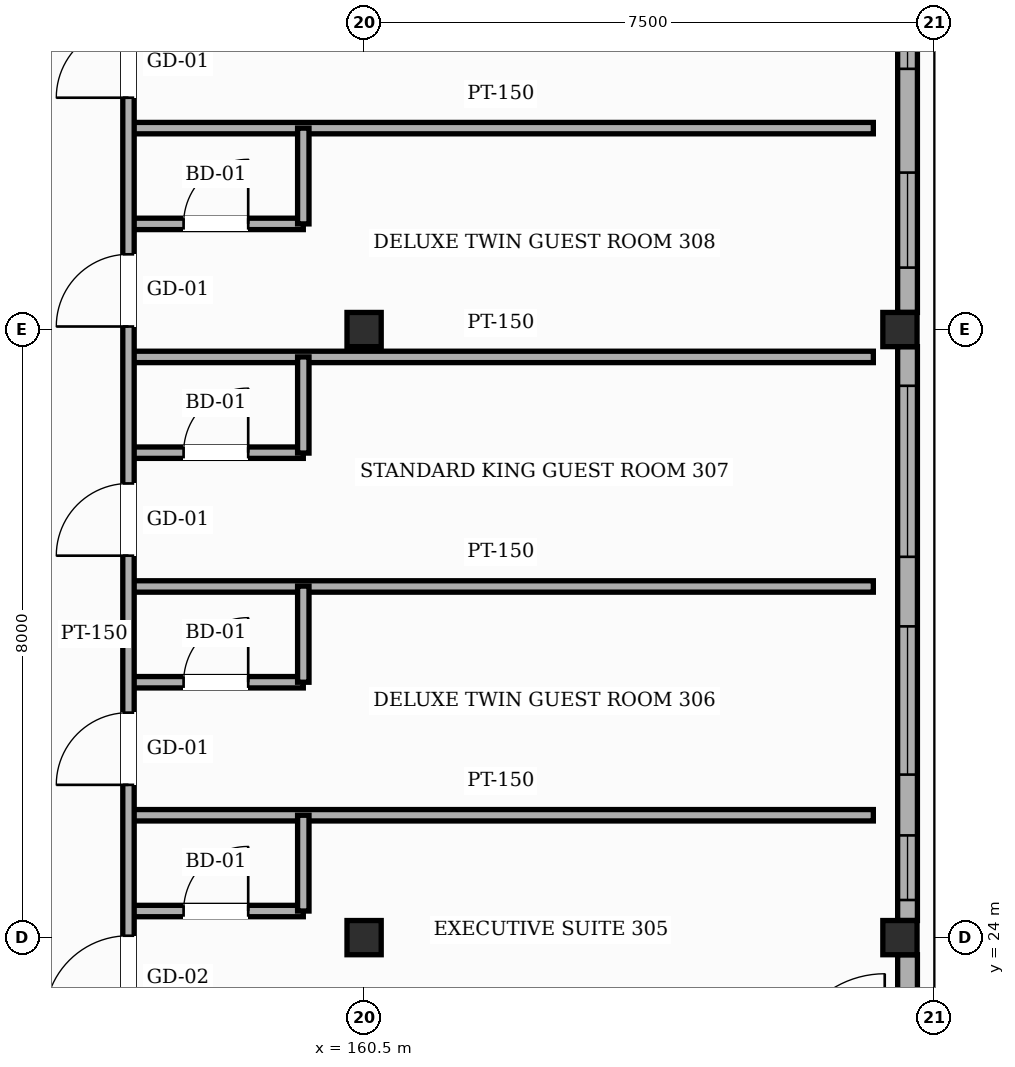
"""IFC4 building model, lengths in metres.
Left out: names, types, materials, properties, quantities, classifications, styles, units other than length and angle.
Written with IfcOpenShell. Run it as: python <this file> out.ifc"""

import sys

from ifc_helpers import new_model, si_unit, direction, frame, frame_2d, origin, origin_2d, place, context, subcontext, project, spatial, rectangle, hollow_rectangle, extrude, element, fill, save


model = new_model("IFC4")
c1 = context("Model", 3, precision=1e-05, world=origin(), true_north=direction((0.0, 1.0)))
c2 = subcontext(c1, "Body", "Model", "MODEL_VIEW")
j1 = project(units=[si_unit("LENGTHUNIT", "METRE"), si_unit("PLANEANGLEUNIT", "RADIAN")], contexts=[c1])
p1 = place(None, origin())
s1 = spatial("IfcSite", under=j1, at=p1, CompositionType="ELEMENT")
p2 = place(p1, origin())
s2 = spatial("IfcBuilding", under=s1, at=p2, CompositionType="ELEMENT")
p3 = place(p2, frame((0.0, 0.0, 42.6)))
s3 = spatial("IfcBuildingStorey", under=s2, at=p3, CompositionType="ELEMENT", Elevation=42.6)
for number, where, z_axis, x_axis in (
    (1, (160.5, 24.0, 0.0), (0.0, 0.0, 1.0), (1.0, 0.0, 0.0)),
    (2, (160.5, 32.0, 0.0), (0.0, 0.0, 1.0), (1.0, 0.0, 0.0)),
    (3, (167.55, 24.0, 0.0), (0.0, 0.0, 1.0), (1.0, 0.0, 0.0)),
    (4, (167.55, 32.0, 0.0), (0.0, 0.0, 1.0), (1.0, 0.0, 0.0)),
):
    element("IfcColumn", number, at=place(p3, frame(where, z_axis=z_axis, x_axis=x_axis)), inside=s3, PredefinedType="COLUMN", context=c2, shape_type="SweptSolid", body=[
        extrude(hollow_rectangle(XDim=0.45, YDim=0.45, WallThickness=0.019, InnerFilletRadius=0.019, OuterFilletRadius=0.038, at=origin_2d()), origin(), (0.0, 0.0, 1.0), 3.6),
    ])
p4 = place(p3, frame((167.65, 23.775, 0.0), z_axis=(0.0, 0.0, 1.0), x_axis=(0.0, -1.0, 0.0)))
e5 = element("IfcWall", 5, at=p4, inside=s3, PredefinedType="SOLIDWALL", context=c2, shape_type="SweptSolid", body=[
    extrude(rectangle(XDim=1.55, YDim=0.26, at=frame_2d((0.775, 0.0))), origin(), (0.0, 0.0, 1.0), 3.365),
])
p5 = place(p3, frame((167.65, 31.775, 0.0), z_axis=(0.0, 0.0, 1.0), x_axis=(0.0, -1.0, 0.0)))
e6 = element("IfcWall", 6, at=p5, inside=s3, PredefinedType="SOLIDWALL", context=c2, shape_type="SweptSolid", body=[
    extrude(rectangle(XDim=7.55, YDim=0.26, at=frame_2d((3.775, 0.0))), origin(), (0.0, 0.0, 1.0), 2.755),
])
p6 = place(p5, frame((6.43, 0.0, 0.85)))
e7 = element("IfcOpeningElement", 7, at=p6, cuts=e6, PredefinedType="OPENING", context=c2, shape_type="SweptSolid", body=[
    extrude(rectangle(XDim=0.85, YDim=1.35, at=frame_2d((0.425, 0.675))), frame((0.0, 0.14, 0.0), z_axis=(0.0, -1.0, 0.0), x_axis=(1.0, 0.0, 0.0)), (0.0, 0.0, 1.0), 0.28),
])
p7 = place(p5, frame((3.68, 0.0, 0.85)))
e8 = element("IfcOpeningElement", 8, at=p7, cuts=e6, PredefinedType="OPENING", context=c2, shape_type="SweptSolid", body=[
    extrude(rectangle(XDim=1.95, YDim=1.5, at=frame_2d((0.975, 0.75))), frame((0.0, 0.14, 0.0), z_axis=(0.0, -1.0, 0.0), x_axis=(1.0, 0.0, 0.0)), (0.0, 0.0, 1.0), 0.28),
])
p8 = place(p5, frame((0.515, 0.0, 0.85)))
e9 = element("IfcOpeningElement", 9, at=p8, cuts=e6, PredefinedType="OPENING", context=c2, shape_type="SweptSolid", body=[
    extrude(rectangle(XDim=2.25, YDim=1.5, at=frame_2d((1.125, 0.75))), frame((0.0, 0.14, 0.0), z_axis=(0.0, -1.0, 0.0), x_axis=(1.0, 0.0, 0.0)), (0.0, 0.0, 1.0), 0.28),
])
p9 = place(p3, frame((167.65, 40.675, 0.0), z_axis=(0.0, 0.0, 1.0), x_axis=(0.0, -1.0, 0.0)))
e10 = element("IfcWall", 10, at=p9, inside=s3, PredefinedType="SOLIDWALL", context=c2, shape_type="SweptSolid", body=[
    extrude(rectangle(XDim=8.45, YDim=0.26, at=frame_2d((4.225, 0.0))), origin(), (0.0, 0.0, 1.0), 2.755),
])
p10 = place(p9, frame((6.61, 0.0, 0.85)))
e11 = element("IfcOpeningElement", 11, at=p10, cuts=e10, PredefinedType="OPENING", context=c2, shape_type="SweptSolid", body=[
    extrude(rectangle(XDim=1.25, YDim=1.65, at=frame_2d((0.625, 0.825))), frame((0.0, 0.14, 0.0), z_axis=(0.0, -1.0, 0.0), x_axis=(1.0, 0.0, 0.0)), (0.0, 0.0, 1.0), 0.28),
])
p11 = place(p9, frame((3.795, 0.0, 0.85)))
e12 = element("IfcOpeningElement", 12, at=p11, cuts=e10, PredefinedType="OPENING", context=c2, shape_type="SweptSolid", body=[
    extrude(rectangle(XDim=1.45, YDim=1.65, at=frame_2d((0.725, 0.825))), frame((0.0, 0.14, 0.0), z_axis=(0.0, -1.0, 0.0), x_axis=(1.0, 0.0, 0.0)), (0.0, 0.0, 1.0), 0.28),
])
p12 = place(p9, frame((0.685, 0.0, 0.85)))
e13 = element("IfcOpeningElement", 13, at=p12, cuts=e10, PredefinedType="OPENING", context=c2, shape_type="SweptSolid", body=[
    extrude(rectangle(XDim=1.65, YDim=1.65, at=frame_2d((0.825, 0.825))), frame((0.0, 0.14, 0.0), z_axis=(0.0, -1.0, 0.0), x_axis=(1.0, 0.0, 0.0)), (0.0, 0.0, 1.0), 0.28),
])
p13 = place(p3, frame((157.4, 24.35, 0.0), z_axis=(0.0, 0.0, 1.0), x_axis=(1.0, 0.0, 0.0)))
e14 = element("IfcWall", 14, at=p13, inside=s3, PredefinedType="PARTITIONING", context=c2, shape_type="SweptSolid", body=[
    extrude(rectangle(XDim=2.3, YDim=0.15, at=frame_2d((1.15, 0.0))), origin(), (0.0, 0.0, 1.0), 3.365),
])
p14 = place(p13, frame((0.725, 0.0, 0.0)))
e15 = element("IfcOpeningElement", 15, at=p14, cuts=e14, PredefinedType="OPENING", context=c2, shape_type="SweptSolid", body=[
    extrude(rectangle(XDim=0.85, YDim=2.1, at=frame_2d((0.425, 1.05))), frame((0.0, 0.085, 0.0), z_axis=(0.0, -1.0, 0.0), x_axis=(1.0, 0.0, 0.0)), (0.0, 0.0, 1.0), 0.17),
])
p15 = place(p3, frame((157.4, 25.61, 0.0), z_axis=(0.0, 0.0, 1.0), x_axis=(1.0, 0.0, 0.0)))
e16 = element("IfcWall", 16, at=p15, inside=s3, PredefinedType="PARTITIONING", context=c2, shape_type="SweptSolid", body=[
    extrude(rectangle(XDim=9.8, YDim=0.15, at=frame_2d((4.9, 0.0))), origin(), (0.0, 0.0, 1.0), 3.365),
])
p16 = place(p3, frame((157.4, 27.36, 0.0), z_axis=(0.0, 0.0, 1.0), x_axis=(1.0, 0.0, 0.0)))
e17 = element("IfcWall", 17, at=p16, inside=s3, PredefinedType="PARTITIONING", context=c2, shape_type="SweptSolid", body=[
    extrude(rectangle(XDim=2.3, YDim=0.15, at=frame_2d((1.15, 0.0))), origin(), (0.0, 0.0, 1.0), 3.365),
])
p17 = place(p16, frame((0.725, 0.0, 0.0)))
e18 = element("IfcOpeningElement", 18, at=p17, cuts=e17, PredefinedType="OPENING", context=c2, shape_type="SweptSolid", body=[
    extrude(rectangle(XDim=0.85, YDim=2.1, at=frame_2d((0.425, 1.05))), frame((0.0, 0.085, 0.0), z_axis=(0.0, -1.0, 0.0), x_axis=(1.0, 0.0, 0.0)), (0.0, 0.0, 1.0), 0.17),
])
p18 = place(p3, frame((157.4, 28.62, 0.0), z_axis=(0.0, 0.0, 1.0), x_axis=(1.0, 0.0, 0.0)))
e19 = element("IfcWall", 19, at=p18, inside=s3, PredefinedType="PARTITIONING", context=c2, shape_type="SweptSolid", body=[
    extrude(rectangle(XDim=9.8, YDim=0.15, at=frame_2d((4.9, 0.0))), origin(), (0.0, 0.0, 1.0), 3.365),
])
p19 = place(p3, frame((157.4, 30.38, 0.0), z_axis=(0.0, 0.0, 1.0), x_axis=(1.0, 0.0, 0.0)))
e20 = element("IfcWall", 20, at=p19, inside=s3, PredefinedType="PARTITIONING", context=c2, shape_type="SweptSolid", body=[
    extrude(rectangle(XDim=2.3, YDim=0.15, at=frame_2d((1.15, 0.0))), origin(), (0.0, 0.0, 1.0), 3.365),
])
p20 = place(p19, frame((0.725, 0.0, 0.0)))
e21 = element("IfcOpeningElement", 21, at=p20, cuts=e20, PredefinedType="OPENING", context=c2, shape_type="SweptSolid", body=[
    extrude(rectangle(XDim=0.85, YDim=2.1, at=frame_2d((0.425, 1.05))), frame((0.0, 0.085, 0.0), z_axis=(0.0, -1.0, 0.0), x_axis=(1.0, 0.0, 0.0)), (0.0, 0.0, 1.0), 0.17),
])
p21 = place(p3, frame((157.4, 31.64, 0.0), z_axis=(0.0, 0.0, 1.0), x_axis=(1.0, 0.0, 0.0)))
e22 = element("IfcWall", 22, at=p21, inside=s3, PredefinedType="PARTITIONING", context=c2, shape_type="SweptSolid", body=[
    extrude(rectangle(XDim=9.8, YDim=0.15, at=frame_2d((4.9, 0.0))), origin(), (0.0, 0.0, 1.0), 3.365),
])
p22 = place(p3, frame((157.4, 33.39, 0.0), z_axis=(0.0, 0.0, 1.0), x_axis=(1.0, 0.0, 0.0)))
e23 = element("IfcWall", 23, at=p22, inside=s3, PredefinedType="PARTITIONING", context=c2, shape_type="SweptSolid", body=[
    extrude(rectangle(XDim=2.3, YDim=0.15, at=frame_2d((1.15, 0.0))), origin(), (0.0, 0.0, 1.0), 3.365),
])
p23 = place(p22, frame((0.725, 0.0, 0.0)))
e24 = element("IfcOpeningElement", 24, at=p23, cuts=e23, PredefinedType="OPENING", context=c2, shape_type="SweptSolid", body=[
    extrude(rectangle(XDim=0.85, YDim=2.1, at=frame_2d((0.425, 1.05))), frame((0.0, 0.085, 0.0), z_axis=(0.0, -1.0, 0.0), x_axis=(1.0, 0.0, 0.0)), (0.0, 0.0, 1.0), 0.17),
])
p24 = place(p3, frame((157.4, 34.65, 0.0), z_axis=(0.0, 0.0, 1.0), x_axis=(1.0, 0.0, 0.0)))
e25 = element("IfcWall", 25, at=p24, inside=s3, PredefinedType="PARTITIONING", context=c2, shape_type="SweptSolid", body=[
    extrude(rectangle(XDim=9.8, YDim=0.15, at=frame_2d((4.9, 0.0))), origin(), (0.0, 0.0, 1.0), 3.365),
])
p25 = place(p3, frame((157.4, 22.6, 0.0), z_axis=(0.0, 0.0, 1.0), x_axis=(0.0, 1.0, 0.0)))
e26 = element("IfcWall", 26, at=p25, inside=s3, PredefinedType="PARTITIONING", context=c2, shape_type="SweptSolid", body=[
    extrude(rectangle(XDim=48.2, YDim=0.15, at=frame_2d((24.1, 0.0))), origin(), (0.0, 0.0, 1.0), 3.365),
])
p26 = place(p25, frame((0.325, 0.0, 0.0)))
e27 = element("IfcOpeningElement", 27, at=p26, cuts=e26, PredefinedType="OPENING", context=c2, shape_type="SweptSolid", body=[
    extrude(rectangle(XDim=1.1, YDim=2.2, at=frame_2d((0.55, 1.1))), frame((0.0, 0.085, 0.0), z_axis=(0.0, -1.0, 0.0), x_axis=(1.0, 0.0, 0.0)), (0.0, 0.0, 1.0), 0.17),
])
p27 = place(p25, frame((3.41, 0.0, 0.0)))
e28 = element("IfcOpeningElement", 28, at=p27, cuts=e26, PredefinedType="OPENING", context=c2, shape_type="SweptSolid", body=[
    extrude(rectangle(XDim=0.95, YDim=2.15, at=frame_2d((0.475, 1.075))), frame((0.0, 0.085, 0.0), z_axis=(0.0, -1.0, 0.0), x_axis=(1.0, 0.0, 0.0)), (0.0, 0.0, 1.0), 0.17),
])
p28 = place(p25, frame((6.425, 0.0, 0.0)))
e29 = element("IfcOpeningElement", 29, at=p28, cuts=e26, PredefinedType="OPENING", context=c2, shape_type="SweptSolid", body=[
    extrude(rectangle(XDim=0.95, YDim=2.15, at=frame_2d((0.475, 1.075))), frame((0.0, 0.085, 0.0), z_axis=(0.0, -1.0, 0.0), x_axis=(1.0, 0.0, 0.0)), (0.0, 0.0, 1.0), 0.17),
])
p29 = place(p25, frame((9.44, 0.0, 0.0)))
e30 = element("IfcOpeningElement", 30, at=p29, cuts=e26, PredefinedType="OPENING", context=c2, shape_type="SweptSolid", body=[
    extrude(rectangle(XDim=0.95, YDim=2.15, at=frame_2d((0.475, 1.075))), frame((0.0, 0.085, 0.0), z_axis=(0.0, -1.0, 0.0), x_axis=(1.0, 0.0, 0.0)), (0.0, 0.0, 1.0), 0.17),
])
p30 = place(p25, frame((12.45, 0.0, 0.0)))
e31 = element("IfcOpeningElement", 31, at=p30, cuts=e26, PredefinedType="OPENING", context=c2, shape_type="SweptSolid", body=[
    extrude(rectangle(XDim=0.95, YDim=2.15, at=frame_2d((0.475, 1.075))), frame((0.0, 0.085, 0.0), z_axis=(0.0, -1.0, 0.0), x_axis=(1.0, 0.0, 0.0)), (0.0, 0.0, 1.0), 0.17),
])
p31 = place(p25, frame((15.46, 0.0, 0.0)))
e32 = element("IfcOpeningElement", 32, at=p31, cuts=e26, PredefinedType="OPENING", context=c2, shape_type="SweptSolid", body=[
    extrude(rectangle(XDim=0.95, YDim=2.15, at=frame_2d((0.475, 1.075))), frame((0.0, 0.085, 0.0), z_axis=(0.0, -1.0, 0.0), x_axis=(1.0, 0.0, 0.0)), (0.0, 0.0, 1.0), 0.17),
])
p32 = place(p25, frame((18.475, 0.0, 0.0)))
e33 = element("IfcOpeningElement", 33, at=p32, cuts=e26, PredefinedType="OPENING", context=c2, shape_type="SweptSolid", body=[
    extrude(rectangle(XDim=0.95, YDim=2.15, at=frame_2d((0.475, 1.075))), frame((0.0, 0.085, 0.0), z_axis=(0.0, -1.0, 0.0), x_axis=(1.0, 0.0, 0.0)), (0.0, 0.0, 1.0), 0.17),
])
p33 = place(p25, frame((21.49, 0.0, 0.0)))
e34 = element("IfcOpeningElement", 34, at=p33, cuts=e26, PredefinedType="OPENING", context=c2, shape_type="SweptSolid", body=[
    extrude(rectangle(XDim=0.95, YDim=2.15, at=frame_2d((0.475, 1.075))), frame((0.0, 0.085, 0.0), z_axis=(0.0, -1.0, 0.0), x_axis=(1.0, 0.0, 0.0)), (0.0, 0.0, 1.0), 0.17),
])
p34 = place(p25, frame((24.5, 0.0, 0.0)))
e35 = element("IfcOpeningElement", 35, at=p34, cuts=e26, PredefinedType="OPENING", context=c2, shape_type="SweptSolid", body=[
    extrude(rectangle(XDim=0.95, YDim=2.15, at=frame_2d((0.475, 1.075))), frame((0.0, 0.085, 0.0), z_axis=(0.0, -1.0, 0.0), x_axis=(1.0, 0.0, 0.0)), (0.0, 0.0, 1.0), 0.17),
])
p35 = place(p25, frame((27.51, 0.0, 0.0)))
e36 = element("IfcOpeningElement", 36, at=p35, cuts=e26, PredefinedType="OPENING", context=c2, shape_type="SweptSolid", body=[
    extrude(rectangle(XDim=0.95, YDim=2.15, at=frame_2d((0.475, 1.075))), frame((0.0, 0.085, 0.0), z_axis=(0.0, -1.0, 0.0), x_axis=(1.0, 0.0, 0.0)), (0.0, 0.0, 1.0), 0.17),
])
p36 = place(p25, frame((30.525, 0.0, 0.0)))
e37 = element("IfcOpeningElement", 37, at=p36, cuts=e26, PredefinedType="OPENING", context=c2, shape_type="SweptSolid", body=[
    extrude(rectangle(XDim=0.95, YDim=2.15, at=frame_2d((0.475, 1.075))), frame((0.0, 0.085, 0.0), z_axis=(0.0, -1.0, 0.0), x_axis=(1.0, 0.0, 0.0)), (0.0, 0.0, 1.0), 0.17),
])
p37 = place(p25, frame((33.54, 0.0, 0.0)))
e38 = element("IfcOpeningElement", 38, at=p37, cuts=e26, PredefinedType="OPENING", context=c2, shape_type="SweptSolid", body=[
    extrude(rectangle(XDim=0.95, YDim=2.15, at=frame_2d((0.475, 1.075))), frame((0.0, 0.085, 0.0), z_axis=(0.0, -1.0, 0.0), x_axis=(1.0, 0.0, 0.0)), (0.0, 0.0, 1.0), 0.17),
])
p38 = place(p25, frame((36.55, 0.0, 0.0)))
e39 = element("IfcOpeningElement", 39, at=p38, cuts=e26, PredefinedType="OPENING", context=c2, shape_type="SweptSolid", body=[
    extrude(rectangle(XDim=0.95, YDim=2.15, at=frame_2d((0.475, 1.075))), frame((0.0, 0.085, 0.0), z_axis=(0.0, -1.0, 0.0), x_axis=(1.0, 0.0, 0.0)), (0.0, 0.0, 1.0), 0.17),
])
p39 = place(p25, frame((39.56, 0.0, 0.0)))
e40 = element("IfcOpeningElement", 40, at=p39, cuts=e26, PredefinedType="OPENING", context=c2, shape_type="SweptSolid", body=[
    extrude(rectangle(XDim=0.95, YDim=2.15, at=frame_2d((0.475, 1.075))), frame((0.0, 0.085, 0.0), z_axis=(0.0, -1.0, 0.0), x_axis=(1.0, 0.0, 0.0)), (0.0, 0.0, 1.0), 0.17),
])
p40 = place(p25, frame((42.575, 0.0, 0.0)))
e41 = element("IfcOpeningElement", 41, at=p40, cuts=e26, PredefinedType="OPENING", context=c2, shape_type="SweptSolid", body=[
    extrude(rectangle(XDim=0.95, YDim=2.15, at=frame_2d((0.475, 1.075))), frame((0.0, 0.085, 0.0), z_axis=(0.0, -1.0, 0.0), x_axis=(1.0, 0.0, 0.0)), (0.0, 0.0, 1.0), 0.17),
])
p41 = place(p25, frame((45.585, 0.0, 0.0)))
e42 = element("IfcOpeningElement", 42, at=p41, cuts=e26, PredefinedType="OPENING", context=c2, shape_type="SweptSolid", body=[
    extrude(rectangle(XDim=0.95, YDim=2.15, at=frame_2d((0.475, 1.075))), frame((0.0, 0.085, 0.0), z_axis=(0.0, -1.0, 0.0), x_axis=(1.0, 0.0, 0.0)), (0.0, 0.0, 1.0), 0.17),
])
p42 = place(p3, frame((159.7, 24.35, 0.0), z_axis=(0.0, 0.0, 1.0), x_axis=(0.0, 1.0, 0.0)))
e43 = element("IfcWall", 43, at=p42, inside=s3, PredefinedType="PARTITIONING", context=c2, shape_type="SweptSolid", body=[
    extrude(rectangle(XDim=1.26, YDim=0.15, at=frame_2d((0.63, 0.0))), origin(), (0.0, 0.0, 1.0), 3.365),
])
for number, where, z_axis, x_axis in (
    (44, (159.7, 27.36, 0.0), (0.0, 0.0, 1.0), (0.0, 1.0, 0.0)),
    (45, (159.7, 30.375, 0.0), (0.0, 0.0, 1.0), (0.0, 1.0, 0.0)),
):
    element("IfcWall", number, at=place(p3, frame(where, z_axis=z_axis, x_axis=x_axis)), inside=s3, PredefinedType="PARTITIONING", context=c2, shape_type="SweptSolid", body=[
        extrude(rectangle(XDim=1.265, YDim=0.15, at=frame_2d((0.632, 0.0))), origin(), (0.0, 0.0, 1.0), 3.365),
    ])
p43 = place(p3, frame((159.7, 33.39, 0.0), z_axis=(0.0, 0.0, 1.0), x_axis=(0.0, 1.0, 0.0)))
e46 = element("IfcWall", 46, at=p43, inside=s3, PredefinedType="PARTITIONING", context=c2, shape_type="SweptSolid", body=[
    extrude(rectangle(XDim=1.26, YDim=0.15, at=frame_2d((0.63, 0.0))), origin(), (0.0, 0.0, 1.0), 3.365),
])
p44 = place(p6, origin())
e47 = element("IfcWindow", 47, at=p44, inside=s3, PartitioningType="SINGLE_PANEL", PredefinedType="WINDOW", context=c2, shape_type="SweptSolid", body=[
    extrude(rectangle(XDim=0.85, YDim=1.35, at=frame_2d((0.425, 0.675))), frame((0.0, 0.03, 0.0), z_axis=(0.0, -1.0, 0.0), x_axis=(1.0, 0.0, 0.0)), (0.0, 0.0, 1.0), 0.06),
])
fill(e7, e47)
p45 = place(p7, origin())
e48 = element("IfcWindow", 48, at=p45, inside=s3, PartitioningType="SINGLE_PANEL", PredefinedType="WINDOW", context=c2, shape_type="SweptSolid", body=[
    extrude(rectangle(XDim=1.95, YDim=1.5, at=frame_2d((0.975, 0.75))), frame((0.0, 0.03, 0.0), z_axis=(0.0, -1.0, 0.0), x_axis=(1.0, 0.0, 0.0)), (0.0, 0.0, 1.0), 0.06),
])
fill(e8, e48)
p46 = place(p8, origin())
e49 = element("IfcWindow", 49, at=p46, inside=s3, PartitioningType="SINGLE_PANEL", PredefinedType="WINDOW", context=c2, shape_type="SweptSolid", body=[
    extrude(rectangle(XDim=2.25, YDim=1.5, at=frame_2d((1.125, 0.75))), frame((0.0, 0.03, 0.0), z_axis=(0.0, -1.0, 0.0), x_axis=(1.0, 0.0, 0.0)), (0.0, 0.0, 1.0), 0.06),
])
fill(e9, e49)
p47 = place(p10, origin())
e50 = element("IfcWindow", 50, at=p47, inside=s3, PartitioningType="SINGLE_PANEL", PredefinedType="WINDOW", context=c2, shape_type="SweptSolid", body=[
    extrude(rectangle(XDim=1.25, YDim=1.65, at=frame_2d((0.625, 0.825))), frame((0.0, 0.03, 0.0), z_axis=(0.0, -1.0, 0.0), x_axis=(1.0, 0.0, 0.0)), (0.0, 0.0, 1.0), 0.06),
])
fill(e11, e50)
p48 = place(p11, origin())
e51 = element("IfcWindow", 51, at=p48, inside=s3, PartitioningType="SINGLE_PANEL", PredefinedType="WINDOW", context=c2, shape_type="SweptSolid", body=[
    extrude(rectangle(XDim=1.45, YDim=1.65, at=frame_2d((0.725, 0.825))), frame((0.0, 0.03, 0.0), z_axis=(0.0, -1.0, 0.0), x_axis=(1.0, 0.0, 0.0)), (0.0, 0.0, 1.0), 0.06),
])
fill(e12, e51)
p49 = place(p26, origin())
e52 = element("IfcDoor", 52, at=p49, inside=s3, OperationType="SINGLE_SWING_LEFT", PredefinedType="DOOR", context=c2, shape_type="SweptSolid", body=[
    extrude(rectangle(XDim=1.1, YDim=2.2, at=frame_2d((0.55, 1.1))), frame((0.0, 0.025, 0.0), z_axis=(0.0, -1.0, 0.0), x_axis=(1.0, 0.0, 0.0)), (0.0, 0.0, 1.0), 0.05),
])
fill(e27, e52)
p50 = place(p14, origin())
e53 = element("IfcDoor", 53, at=p50, inside=s3, OperationType="SINGLE_SWING_RIGHT", PredefinedType="DOOR", context=c2, shape_type="SweptSolid", body=[
    extrude(rectangle(XDim=0.85, YDim=2.1, at=frame_2d((0.425, 1.05))), frame((0.0, 0.025, 0.0), z_axis=(0.0, -1.0, 0.0), x_axis=(1.0, 0.0, 0.0)), (0.0, 0.0, 1.0), 0.05),
])
fill(e15, e53)
p51 = place(p27, origin())
e54 = element("IfcDoor", 54, at=p51, inside=s3, OperationType="SINGLE_SWING_LEFT", PredefinedType="DOOR", context=c2, shape_type="SweptSolid", body=[
    extrude(rectangle(XDim=0.95, YDim=2.15, at=frame_2d((0.475, 1.075))), frame((0.0, 0.025, 0.0), z_axis=(0.0, -1.0, 0.0), x_axis=(1.0, 0.0, 0.0)), (0.0, 0.0, 1.0), 0.05),
])
fill(e28, e54)
p52 = place(p17, origin())
e55 = element("IfcDoor", 55, at=p52, inside=s3, OperationType="SINGLE_SWING_RIGHT", PredefinedType="DOOR", context=c2, shape_type="SweptSolid", body=[
    extrude(rectangle(XDim=0.85, YDim=2.1, at=frame_2d((0.425, 1.05))), frame((0.0, 0.025, 0.0), z_axis=(0.0, -1.0, 0.0), x_axis=(1.0, 0.0, 0.0)), (0.0, 0.0, 1.0), 0.05),
])
fill(e18, e55)
p53 = place(p28, origin())
e56 = element("IfcDoor", 56, at=p53, inside=s3, OperationType="SINGLE_SWING_LEFT", PredefinedType="DOOR", context=c2, shape_type="SweptSolid", body=[
    extrude(rectangle(XDim=0.95, YDim=2.15, at=frame_2d((0.475, 1.075))), frame((0.0, 0.025, 0.0), z_axis=(0.0, -1.0, 0.0), x_axis=(1.0, 0.0, 0.0)), (0.0, 0.0, 1.0), 0.05),
])
fill(e29, e56)
p54 = place(p20, origin())
e57 = element("IfcDoor", 57, at=p54, inside=s3, OperationType="SINGLE_SWING_RIGHT", PredefinedType="DOOR", context=c2, shape_type="SweptSolid", body=[
    extrude(rectangle(XDim=0.85, YDim=2.1, at=frame_2d((0.425, 1.05))), frame((0.0, 0.025, 0.0), z_axis=(0.0, -1.0, 0.0), x_axis=(1.0, 0.0, 0.0)), (0.0, 0.0, 1.0), 0.05),
])
fill(e21, e57)
p55 = place(p29, origin())
e58 = element("IfcDoor", 58, at=p55, inside=s3, OperationType="SINGLE_SWING_LEFT", PredefinedType="DOOR", context=c2, shape_type="SweptSolid", body=[
    extrude(rectangle(XDim=0.95, YDim=2.15, at=frame_2d((0.475, 1.075))), frame((0.0, 0.025, 0.0), z_axis=(0.0, -1.0, 0.0), x_axis=(1.0, 0.0, 0.0)), (0.0, 0.0, 1.0), 0.05),
])
fill(e30, e58)
p56 = place(p23, origin())
e59 = element("IfcDoor", 59, at=p56, inside=s3, OperationType="SINGLE_SWING_RIGHT", PredefinedType="DOOR", context=c2, shape_type="SweptSolid", body=[
    extrude(rectangle(XDim=0.85, YDim=2.1, at=frame_2d((0.425, 1.05))), frame((0.0, 0.025, 0.0), z_axis=(0.0, -1.0, 0.0), x_axis=(1.0, 0.0, 0.0)), (0.0, 0.0, 1.0), 0.05),
])
fill(e24, e59)
p57 = place(p30, origin())
e60 = element("IfcDoor", 60, at=p57, inside=s3, OperationType="SINGLE_SWING_LEFT", PredefinedType="DOOR", context=c2, shape_type="SweptSolid", body=[
    extrude(rectangle(XDim=0.95, YDim=2.15, at=frame_2d((0.475, 1.075))), frame((0.0, 0.025, 0.0), z_axis=(0.0, -1.0, 0.0), x_axis=(1.0, 0.0, 0.0)), (0.0, 0.0, 1.0), 0.05),
])
fill(e31, e60)
save(model, sys.argv[1])
